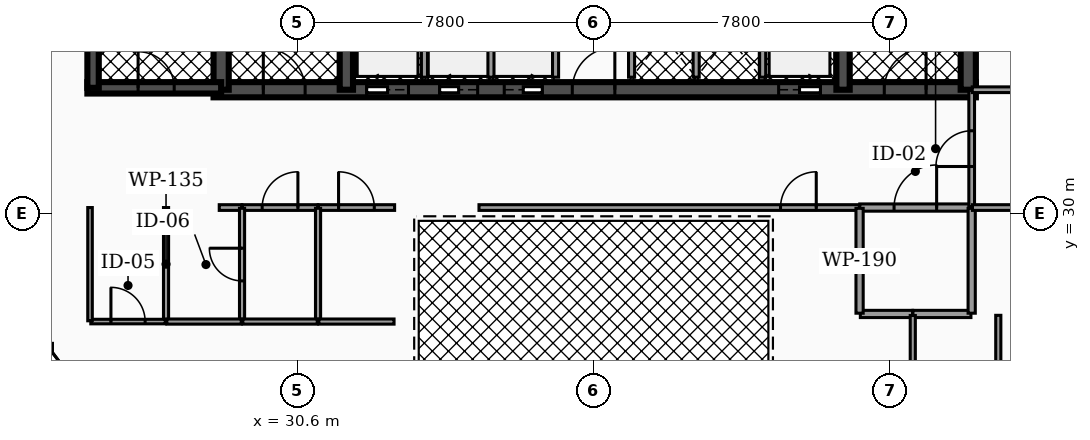
"""IFC4 building model, lengths in metres.
Left out: names, types, materials, properties, quantities, classifications, styles, units other than length and angle.
Written with IfcOpenShell. Run it as: python <this file> out.ifc"""

import sys

from ifc_helpers import new_model, si_unit, direction, frame, frame_2d, origin, place, context, subcontext, project, spatial, rectangle, extrude, element, fill, save


model = new_model("IFC4")
c1 = context("Model", 3, precision=1e-05, world=origin(), true_north=direction((0.0, 1.0)))
c2 = subcontext(c1, "Body", "Model", "MODEL_VIEW")
j1 = project(units=[si_unit("LENGTHUNIT", "METRE"), si_unit("PLANEANGLEUNIT", "RADIAN")], contexts=[c1])
p1 = place(None, origin())
s1 = spatial("IfcSite", under=j1, at=p1, CompositionType="ELEMENT")
p2 = place(p1, origin())
s2 = spatial("IfcBuilding", under=s1, at=p2, CompositionType="ELEMENT")
p3 = place(p2, frame((0.0, 0.0, 172.04)))
s3 = spatial("IfcBuildingStorey", under=s2, at=p3, CompositionType="ELEMENT", Elevation=172.04)
p4 = place(p3, frame((28.4, 33.25, 0.0), z_axis=(0.0, 0.0, 1.0), x_axis=(1.0, 0.0, 0.0)))
e1 = element("IfcWall", 1, at=p4, inside=s3, PredefinedType="SHEAR", context=c2, shape_type="SweptSolid", body=[
    extrude(rectangle(XDim=20.06, YDim=0.4, at=frame_2d((10.03, 0.0))), origin(), (0.0, 0.0, 1.0), 3.5),
])
p5 = place(p4, frame((4.03, 0.0, 0.0)))
e2 = element("IfcOpeningElement", 2, at=p5, cuts=e1, PredefinedType="OPENING", context=c2, shape_type="SweptSolid", body=[
    extrude(rectangle(XDim=1.1, YDim=2.15, at=frame_2d((0.55, 1.075))), frame((0.0, 0.21, 0.0), z_axis=(0.0, -1.0, 0.0), x_axis=(1.0, 0.0, 0.0)), (0.0, 0.0, 1.0), 0.42),
])
p6 = place(p4, frame((14.87, 0.0, 0.0)))
e3 = element("IfcOpeningElement", 3, at=p6, cuts=e1, PredefinedType="OPENING", context=c2, shape_type="SweptSolid", body=[
    extrude(rectangle(XDim=1.1, YDim=2.15, at=frame_2d((0.55, 1.075))), frame((0.0, 0.21, 0.0), z_axis=(0.0, -1.0, 0.0), x_axis=(1.0, 0.0, 0.0)), (0.0, 0.0, 1.0), 0.42),
])
p7 = place(p4, frame((5.95, 0.0, 0.0)))
e4 = element("IfcOpeningElement", 4, at=p7, cuts=e1, PredefinedType="OPENING", context=c2, shape_type="SweptSolid", body=[
    extrude(rectangle(XDim=1.0, YDim=2.1, at=frame_2d((0.5, 1.05))), frame((0.0, 0.21, 0.0), z_axis=(0.0, -1.0, 0.0), x_axis=(1.0, 0.0, 0.0)), (0.0, 0.0, 1.0), 0.42),
])
p8 = place(p4, frame((7.65, 0.0, 0.0)))
e5 = element("IfcOpeningElement", 5, at=p8, cuts=e1, PredefinedType="OPENING", context=c2, shape_type="SweptSolid", body=[
    extrude(rectangle(XDim=1.0, YDim=2.1, at=frame_2d((0.5, 1.05))), frame((0.0, 0.21, 0.0), z_axis=(0.0, -1.0, 0.0), x_axis=(1.0, 0.0, 0.0)), (0.0, 0.0, 1.0), 0.42),
])
p9 = place(p4, frame((1.31, 0.0, 0.0)))
e6 = element("IfcOpeningElement", 6, at=p9, cuts=e1, PredefinedType="OPENING", context=c2, shape_type="SweptSolid", body=[
    extrude(rectangle(XDim=1.1, YDim=2.2, at=frame_2d((0.55, 1.1))), frame((0.0, 0.21, 0.0), z_axis=(0.0, -1.0, 0.0), x_axis=(1.0, 0.0, 0.0)), (0.0, 0.0, 1.0), 0.42),
])
p10 = place(p4, frame((9.44, 0.0, 0.0)))
e7 = element("IfcOpeningElement", 7, at=p10, cuts=e1, PredefinedType="OPENING", context=c2, shape_type="SweptSolid", body=[
    extrude(rectangle(XDim=1.12, YDim=2.05, at=frame_2d((0.56, 1.025))), frame((0.0, 0.21, 0.0), z_axis=(0.0, -1.0, 0.0), x_axis=(1.0, 0.0, 0.0)), (0.0, 0.0, 1.0), 0.42),
])
p11 = place(p4, frame((17.65, 0.0, 0.0)))
e8 = element("IfcOpeningElement", 8, at=p11, cuts=e1, PredefinedType="OPENING", context=c2, shape_type="SweptSolid", body=[
    extrude(rectangle(XDim=1.1, YDim=2.2, at=frame_2d((0.55, 1.1))), frame((0.0, 0.21, 0.0), z_axis=(0.0, -1.0, 0.0), x_axis=(1.0, 0.0, 0.0)), (0.0, 0.0, 1.0), 0.42),
])
p12 = place(p3, frame((28.6, 33.25, 0.0), z_axis=(0.0, 0.0, 1.0), x_axis=(0.0, 1.0, 0.0)))
e9 = element("IfcWall", 9, at=p12, inside=s3, PredefinedType="SHEAR", context=c2, shape_type="SweptSolid", body=[
    extrude(rectangle(XDim=10.2, YDim=0.4, at=frame_2d((5.1, 0.0))), origin(), (0.0, 0.0, 1.0), 3.5),
])
for number, where, z_axis, x_axis in (
    (10, (31.895, 33.25, 0.0), (0.0, 0.0, 1.0), (0.0, 1.0, 0.0)),
    (11, (44.965, 33.25, 0.0), (0.0, 0.0, 1.0), (0.0, 1.0, 0.0)),
):
    element("IfcWall", number, at=place(p3, frame(where, z_axis=z_axis, x_axis=x_axis)), inside=s3, PredefinedType="SHEAR", context=c2, shape_type="SweptSolid", body=[
        extrude(rectangle(XDim=10.2, YDim=0.35, at=frame_2d((5.1, 0.0))), origin(), (0.0, 0.0, 1.0), 3.5),
    ])
p13 = place(p3, frame((48.26, 33.25, 0.0), z_axis=(0.0, 0.0, 1.0), x_axis=(0.0, 1.0, 0.0)))
e12 = element("IfcWall", 12, at=p13, inside=s3, PredefinedType="SHEAR", context=c2, shape_type="SweptSolid", body=[
    extrude(rectangle(XDim=10.2, YDim=0.4, at=frame_2d((5.1, 0.0))), origin(), (0.0, 0.0, 1.0), 3.5),
])
p14 = place(p3, frame((25.08, 33.3, 0.0), z_axis=(0.0, 0.0, 1.0), x_axis=(1.0, 0.0, 0.0)))
e13 = element("IfcWall", 13, at=p14, inside=s3, PredefinedType="SHEAR", context=c2, shape_type="SweptSolid", body=[
    extrude(rectangle(XDim=3.52, YDim=0.3, at=frame_2d((1.76, 0.0))), origin(), (0.0, 0.0, 1.0), 3.5),
])
p15 = place(p14, frame((1.335, 0.0, 0.0)))
e14 = element("IfcOpeningElement", 14, at=p15, cuts=e13, PredefinedType="OPENING", context=c2, shape_type="SweptSolid", body=[
    extrude(rectangle(XDim=0.95, YDim=2.2, at=frame_2d((0.475, 1.1))), frame((0.0, 0.16, 0.0), z_axis=(0.0, -1.0, 0.0), x_axis=(1.0, 0.0, 0.0)), (0.0, 0.0, 1.0), 0.32),
])
p16 = place(p3, frame((25.23, 33.3, 0.0), z_axis=(0.0, 0.0, 1.0), x_axis=(0.0, 1.0, 0.0)))
e15 = element("IfcWall", 15, at=p16, inside=s3, PredefinedType="SHEAR", context=c2, shape_type="SweptSolid", body=[
    extrude(rectangle(XDim=7.6, YDim=0.3, at=frame_2d((3.8, 0.0))), origin(), (0.0, 0.0, 1.0), 3.5),
])
for number, where, z_axis, x_axis in (
    (16, (33.95, 33.58, 0.0), (0.0, 0.0, 1.0), (0.0, 1.0, 0.0)),
    (17, (42.85, 33.58, 0.0), (0.0, 0.0, 1.0), (0.0, 1.0, 0.0)),
):
    element("IfcWall", number, at=place(p3, frame(where, z_axis=z_axis, x_axis=x_axis)), inside=s3, PredefinedType="SOLIDWALL", context=c2, shape_type="SweptSolid", body=[
        extrude(rectangle(XDim=2.45, YDim=0.16, at=frame_2d((1.225, 0.0))), origin(), (0.0, 0.0, 1.0), 2.472),
    ])
for number, where, z_axis, x_axis in (
    (18, (35.7, 33.58, 0.0), (0.0, 0.0, 1.0), (0.0, 1.0, 0.0)),
    (19, (37.4, 33.58, 0.0), (0.0, 0.0, 1.0), (0.0, 1.0, 0.0)),
    (20, (39.4, 33.58, 0.0), (0.0, 0.0, 1.0), (0.0, 1.0, 0.0)),
    (21, (41.1, 33.58, 0.0), (0.0, 0.0, 1.0), (0.0, 1.0, 0.0)),
):
    element("IfcWall", number, at=place(p3, frame(where, z_axis=z_axis, x_axis=x_axis)), inside=s3, PredefinedType="SOLIDWALL", context=c2, shape_type="SweptSolid", body=[
        extrude(rectangle(XDim=2.25, YDim=0.16, at=frame_2d((1.125, 0.0))), origin(), (0.0, 0.0, 1.0), 2.472),
    ])
p17 = place(p3, frame((45.405, 30.15, 0.0), z_axis=(0.0, 0.0, 1.0), x_axis=(1.0, 0.0, 0.0)))
e22 = element("IfcWall", 22, at=p17, inside=s3, PredefinedType="PARTITIONING", context=c2, shape_type="SweptSolid", body=[
    extrude(rectangle(XDim=2.925, YDim=0.19, at=frame_2d((1.462, 0.0))), origin(), (0.0, 0.0, 1.0), 2.457),
])
p18 = place(p17, frame((0.903, 0.0, 0.0)))
e23 = element("IfcOpeningElement", 23, at=p18, cuts=e22, PredefinedType="OPENING", context=c2, shape_type="SweptSolid", body=[
    extrude(rectangle(XDim=1.12, YDim=2.05, at=frame_2d((0.56, 1.025))), frame((0.0, 0.105, 0.0), z_axis=(0.0, -1.0, 0.0), x_axis=(1.0, 0.0, 0.0)), (0.0, 0.0, 1.0), 0.21),
])
p19 = place(p3, frame((48.35, 30.17, 0.0), z_axis=(0.0, 0.0, 1.0), x_axis=(0.0, 1.0, 0.0)))
e24 = element("IfcWall", 24, at=p19, inside=s3, PredefinedType="PARTITIONING", context=c2, shape_type="SweptSolid", body=[
    extrude(rectangle(XDim=3.06, YDim=0.15, at=frame_2d((1.53, 0.0))), origin(), (0.0, 0.0, 1.0), 2.457),
])
p20 = place(p19, frame((1.06, 0.0, 0.0)))
e25 = element("IfcOpeningElement", 25, at=p20, cuts=e24, PredefinedType="OPENING", context=c2, shape_type="SweptSolid", body=[
    extrude(rectangle(XDim=0.94, YDim=2.05, at=frame_2d((0.47, 1.025))), frame((0.0, 0.085, 0.0), z_axis=(0.0, -1.0, 0.0), x_axis=(1.0, 0.0, 0.0)), (0.0, 0.0, 1.0), 0.17),
])
p21 = place(p3, frame((28.55, 30.15, 0.0), z_axis=(0.0, 0.0, 1.0), x_axis=(1.0, 0.0, 0.0)))
e26 = element("IfcWall", 26, at=p21, inside=s3, PredefinedType="PARTITIONING", context=c2, shape_type="SweptSolid", body=[
    extrude(rectangle(XDim=0.595, YDim=0.15, at=frame_2d((0.297, 0.0))), origin(), (0.0, 0.0, 1.0), 2.457),
])
p22 = place(p3, frame((29.155, 30.15, 0.0), z_axis=(0.0, 0.0, 1.0), x_axis=(1.0, 0.0, 0.0)))
e27 = element("IfcWall", 27, at=p22, inside=s3, PredefinedType="PARTITIONING", context=c2, shape_type="SweptSolid", body=[
    extrude(rectangle(XDim=1.99, YDim=0.15, at=frame_2d((0.995, 0.0))), origin(), (0.0, 0.0, 1.0), 2.457),
])
p23 = place(p22, frame((0.525, 0.0, 0.0)))
e28 = element("IfcOpeningElement", 28, at=p23, cuts=e27, PredefinedType="OPENING", context=c2, shape_type="SweptSolid", body=[
    extrude(rectangle(XDim=0.94, YDim=2.05, at=frame_2d((0.47, 1.025))), frame((0.0, 0.085, 0.0), z_axis=(0.0, -1.0, 0.0), x_axis=(1.0, 0.0, 0.0)), (0.0, 0.0, 1.0), 0.17),
])
p24 = place(p3, frame((31.155, 30.15, 0.0), z_axis=(0.0, 0.0, 1.0), x_axis=(1.0, 0.0, 0.0)))
e29 = element("IfcWall", 29, at=p24, inside=s3, PredefinedType="PARTITIONING", context=c2, shape_type="SweptSolid", body=[
    extrude(rectangle(XDim=2.01, YDim=0.15, at=frame_2d((1.005, 0.0))), origin(), (0.0, 0.0, 1.0), 2.457),
])
p25 = place(p24, frame((0.535, 0.0, 0.0)))
e30 = element("IfcOpeningElement", 30, at=p25, cuts=e29, PredefinedType="OPENING", context=c2, shape_type="SweptSolid", body=[
    extrude(rectangle(XDim=0.94, YDim=2.05, at=frame_2d((0.47, 1.025))), frame((0.0, 0.085, 0.0), z_axis=(0.0, -1.0, 0.0), x_axis=(1.0, 0.0, 0.0)), (0.0, 0.0, 1.0), 0.17),
])
p26 = place(p3, frame((35.385, 30.15, 0.0), z_axis=(0.0, 0.0, 1.0), x_axis=(1.0, 0.0, 0.0)))
e31 = element("IfcWall", 31, at=p26, inside=s3, PredefinedType="PARTITIONING", context=c2, shape_type="SweptSolid", body=[
    extrude(rectangle(XDim=10.01, YDim=0.15, at=frame_2d((5.005, 0.0))), origin(), (0.0, 0.0, 1.0), 2.457),
])
p27 = place(p26, frame((7.935, 0.0, 0.0)))
e32 = element("IfcOpeningElement", 32, at=p27, cuts=e31, PredefinedType="OPENING", context=c2, shape_type="SweptSolid", body=[
    extrude(rectangle(XDim=0.94, YDim=2.05, at=frame_2d((0.47, 1.025))), frame((0.0, 0.085, 0.0), z_axis=(0.0, -1.0, 0.0), x_axis=(1.0, 0.0, 0.0)), (0.0, 0.0, 1.0), 0.17),
])
p28 = place(p3, frame((45.42, 27.35, 0.0), z_axis=(0.0, 0.0, 1.0), x_axis=(1.0, 0.0, 0.0)))
e33 = element("IfcWall", 33, at=p28, inside=s3, PredefinedType="PARTITIONING", context=c2, shape_type="SweptSolid", body=[
    extrude(rectangle(XDim=1.375, YDim=0.19, at=frame_2d((0.688, 0.0))), origin(), (0.0, 0.0, 1.0), 2.457),
])
p29 = place(p3, frame((45.4, 27.37, 0.0), z_axis=(0.0, 0.0, 1.0), x_axis=(0.0, 1.0, 0.0)))
e34 = element("IfcWall", 34, at=p29, inside=s3, PredefinedType="PARTITIONING", context=c2, shape_type="SweptSolid", body=[
    extrude(rectangle(XDim=2.76, YDim=0.19, at=frame_2d((1.38, 0.0))), origin(), (0.0, 0.0, 1.0), 2.457),
])
p30 = place(p3, frame((46.805, 27.35, 0.0), z_axis=(0.0, 0.0, 1.0), x_axis=(1.0, 0.0, 0.0)))
e35 = element("IfcWall", 35, at=p30, inside=s3, PredefinedType="PARTITIONING", context=c2, shape_type="SweptSolid", body=[
    extrude(rectangle(XDim=1.525, YDim=0.19, at=frame_2d((0.763, 0.0))), origin(), (0.0, 0.0, 1.0), 2.457),
])
p31 = place(p3, frame((48.35, 27.37, 0.0), z_axis=(0.0, 0.0, 1.0), x_axis=(0.0, 1.0, 0.0)))
e36 = element("IfcWall", 36, at=p31, inside=s3, PredefinedType="PARTITIONING", context=c2, shape_type="SweptSolid", body=[
    extrude(rectangle(XDim=2.76, YDim=0.19, at=frame_2d((1.38, 0.0))), origin(), (0.0, 0.0, 1.0), 2.457),
])
p32 = place(p3, frame((48.37, 30.15, 0.0), z_axis=(0.0, 0.0, 1.0), x_axis=(1.0, 0.0, 0.0)))
e37 = element("IfcWall", 37, at=p32, inside=s3, PredefinedType="PARTITIONING", context=c2, shape_type="SweptSolid", body=[
    extrude(rectangle(XDim=3.26, YDim=0.15, at=frame_2d((1.63, 0.0))), origin(), (0.0, 0.0, 1.0), 2.457),
])
p33 = place(p32, frame((1.16, 0.0, 0.0)))
e38 = element("IfcOpeningElement", 38, at=p33, cuts=e37, PredefinedType="OPENING", context=c2, shape_type="SweptSolid", body=[
    extrude(rectangle(XDim=0.94, YDim=2.05, at=frame_2d((0.47, 1.025))), frame((0.0, 0.085, 0.0), z_axis=(0.0, -1.0, 0.0), x_axis=(1.0, 0.0, 0.0)), (0.0, 0.0, 1.0), 0.17),
])
p34 = place(p3, frame((48.365, 33.25, 0.0), z_axis=(0.0, 0.0, 1.0), x_axis=(1.0, 0.0, 0.0)))
e39 = element("IfcWall", 39, at=p34, inside=s3, PredefinedType="PARTITIONING", context=c2, shape_type="SweptSolid", body=[
    extrude(rectangle(XDim=3.265, YDim=0.15, at=frame_2d((1.632, 0.0))), origin(), (0.0, 0.0, 1.0), 2.457),
])
p35 = place(p3, frame((27.15, 27.17, 0.0), z_axis=(0.0, 0.0, 1.0), x_axis=(0.0, 1.0, 0.0)))
e40 = element("IfcWall", 40, at=p35, inside=s3, PredefinedType="PARTITIONING", context=c2, shape_type="SweptSolid", body=[
    extrude(rectangle(XDim=2.98, YDim=0.135, at=frame_2d((1.49, 0.0))), origin(), (0.0, 0.0, 1.0), 2.457),
])
p36 = place(p3, frame((25.17, 27.15, 0.0), z_axis=(0.0, 0.0, 1.0), x_axis=(1.0, 0.0, 0.0)))
e41 = element("IfcWall", 41, at=p36, inside=s3, PredefinedType="PARTITIONING", context=c2, shape_type="SweptSolid", body=[
    extrude(rectangle(XDim=1.96, YDim=0.12, at=frame_2d((0.98, 0.0))), origin(), (0.0, 0.0, 1.0), 2.457),
])
p37 = place(p36, frame((0.53, 0.0, 0.0)))
e42 = element("IfcOpeningElement", 42, at=p37, cuts=e41, PredefinedType="OPENING", context=c2, shape_type="SweptSolid", body=[
    extrude(rectangle(XDim=0.9, YDim=2.05, at=frame_2d((0.45, 1.025))), frame((0.0, 0.07, 0.0), z_axis=(0.0, -1.0, 0.0), x_axis=(1.0, 0.0, 0.0)), (0.0, 0.0, 1.0), 0.14),
])
p38 = place(p3, frame((25.15, 27.17, 0.0), z_axis=(0.0, 0.0, 1.0), x_axis=(0.0, 1.0, 0.0)))
e43 = element("IfcWall", 43, at=p38, inside=s3, PredefinedType="PARTITIONING", context=c2, shape_type="SweptSolid", body=[
    extrude(rectangle(XDim=2.98, YDim=0.12, at=frame_2d((1.49, 0.0))), origin(), (0.0, 0.0, 1.0), 2.457),
])
p39 = place(p3, frame((29.15, 27.17, 0.0), z_axis=(0.0, 0.0, 1.0), x_axis=(0.0, 1.0, 0.0)))
e44 = element("IfcWall", 44, at=p39, inside=s3, PredefinedType="PARTITIONING", context=c2, shape_type="SweptSolid", body=[
    extrude(rectangle(XDim=2.96, YDim=0.135, at=frame_2d((1.48, 0.0))), origin(), (0.0, 0.0, 1.0), 2.457),
])
p40 = place(p39, frame((1.05, 0.0, 0.0)))
e45 = element("IfcOpeningElement", 45, at=p40, cuts=e44, PredefinedType="OPENING", context=c2, shape_type="SweptSolid", body=[
    extrude(rectangle(XDim=0.86, YDim=2.05, at=frame_2d((0.43, 1.025))), frame((0.0, 0.077, 0.0), z_axis=(0.0, -1.0, 0.0), x_axis=(1.0, 0.0, 0.0)), (0.0, 0.0, 1.0), 0.155),
])
p41 = place(p3, frame((27.17, 27.15, 0.0), z_axis=(0.0, 0.0, 1.0), x_axis=(1.0, 0.0, 0.0)))
e46 = element("IfcWall", 46, at=p41, inside=s3, PredefinedType="PARTITIONING", context=c2, shape_type="SweptSolid", body=[
    extrude(rectangle(XDim=1.96, YDim=0.135, at=frame_2d((0.98, 0.0))), origin(), (0.0, 0.0, 1.0), 2.457),
])
p42 = place(p3, frame((31.15, 27.17, 0.0), z_axis=(0.0, 0.0, 1.0), x_axis=(0.0, 1.0, 0.0)))
e47 = element("IfcWall", 47, at=p42, inside=s3, PredefinedType="PARTITIONING", context=c2, shape_type="SweptSolid", body=[
    extrude(rectangle(XDim=2.96, YDim=0.135, at=frame_2d((1.48, 0.0))), origin(), (0.0, 0.0, 1.0), 2.457),
])
p43 = place(p3, frame((29.17, 27.15, 0.0), z_axis=(0.0, 0.0, 1.0), x_axis=(1.0, 0.0, 0.0)))
e48 = element("IfcWall", 48, at=p43, inside=s3, PredefinedType="PARTITIONING", context=c2, shape_type="SweptSolid", body=[
    extrude(rectangle(XDim=1.96, YDim=0.135, at=frame_2d((0.98, 0.0))), origin(), (0.0, 0.0, 1.0), 2.457),
])
p44 = place(p3, frame((31.17, 27.15, 0.0), z_axis=(0.0, 0.0, 1.0), x_axis=(1.0, 0.0, 0.0)))
e49 = element("IfcWall", 49, at=p44, inside=s3, PredefinedType="PARTITIONING", context=c2, shape_type="SweptSolid", body=[
    extrude(rectangle(XDim=1.98, YDim=0.135, at=frame_2d((0.99, 0.0))), origin(), (0.0, 0.0, 1.0), 2.457),
])
p45 = place(p3, frame((46.8, 25.169, 0.0), z_axis=(0.0, 0.0, 1.0), x_axis=(0.0, 1.0, 0.0)))
e50 = element("IfcWall", 50, at=p45, inside=s3, PredefinedType="PARTITIONING", context=c2, shape_type="SweptSolid", body=[
    extrude(rectangle(XDim=2.14, YDim=0.135, at=frame_2d((1.07, 0.0))), origin(), (0.0, 0.0, 1.0), 2.457),
])
p46 = place(p3, frame((49.05, 25.184, 0.0), z_axis=(0.0, 0.0, 1.0), x_axis=(0.0, 1.0, 0.0)))
e51 = element("IfcWall", 51, at=p46, inside=s3, PredefinedType="PARTITIONING", context=c2, shape_type="SweptSolid", body=[
    extrude(rectangle(XDim=2.13, YDim=0.135, at=frame_2d((1.065, 0.0))), origin(), (0.0, 0.0, 1.0), 2.457),
])
p47 = place(p5, origin())
e52 = element("IfcDoor", 52, at=p47, inside=s3, OperationType="SLIDING_TO_LEFT", PredefinedType="DOOR", context=c2, shape_type="SweptSolid", body=[
    extrude(rectangle(XDim=1.1, YDim=2.15, at=frame_2d((0.55, 1.075))), frame((0.0, 0.025, 0.0), z_axis=(0.0, -1.0, 0.0), x_axis=(1.0, 0.0, 0.0)), (0.0, 0.0, 1.0), 0.05),
])
fill(e2, e52)
p48 = place(p6, origin())
e53 = element("IfcDoor", 53, at=p48, inside=s3, OperationType="SLIDING_TO_RIGHT", PredefinedType="DOOR", context=c2, shape_type="SweptSolid", body=[
    extrude(rectangle(XDim=1.1, YDim=2.15, at=frame_2d((0.55, 1.075))), frame((0.0, 0.025, 0.0), z_axis=(0.0, -1.0, 0.0), x_axis=(1.0, 0.0, 0.0)), (0.0, 0.0, 1.0), 0.05),
])
fill(e3, e53)
p49 = place(p7, origin())
e54 = element("IfcDoor", 54, at=p49, inside=s3, OperationType="SLIDING_TO_LEFT", PredefinedType="DOOR", context=c2, shape_type="SweptSolid", body=[
    extrude(rectangle(XDim=1.0, YDim=2.1, at=frame_2d((0.5, 1.05))), frame((0.0, 0.025, 0.0), z_axis=(0.0, -1.0, 0.0), x_axis=(1.0, 0.0, 0.0)), (0.0, 0.0, 1.0), 0.05),
])
fill(e4, e54)
p50 = place(p8, origin())
e55 = element("IfcDoor", 55, at=p50, inside=s3, OperationType="SLIDING_TO_RIGHT", PredefinedType="DOOR", context=c2, shape_type="SweptSolid", body=[
    extrude(rectangle(XDim=1.0, YDim=2.1, at=frame_2d((0.5, 1.05))), frame((0.0, 0.025, 0.0), z_axis=(0.0, -1.0, 0.0), x_axis=(1.0, 0.0, 0.0)), (0.0, 0.0, 1.0), 0.05),
])
fill(e5, e55)
p51 = place(p9, origin())
e56 = element("IfcDoor", 56, at=p51, inside=s3, OperationType="SINGLE_SWING_LEFT", PredefinedType="DOOR", context=c2, shape_type="SweptSolid", body=[
    extrude(rectangle(XDim=1.1, YDim=2.2, at=frame_2d((0.55, 1.1))), frame((0.0, 0.025, 0.0), z_axis=(0.0, -1.0, 0.0), x_axis=(1.0, 0.0, 0.0)), (0.0, 0.0, 1.0), 0.05),
])
fill(e6, e56)
p52 = place(p10, origin())
e57 = element("IfcDoor", 57, at=p52, inside=s3, OperationType="SINGLE_SWING_RIGHT", PredefinedType="DOOR", context=c2, shape_type="SweptSolid", body=[
    extrude(rectangle(XDim=1.12, YDim=2.05, at=frame_2d((0.56, 1.025))), frame((0.0, 0.025, 0.0), z_axis=(0.0, -1.0, 0.0), x_axis=(1.0, 0.0, 0.0)), (0.0, 0.0, 1.0), 0.05),
])
fill(e7, e57)
p53 = place(p11, origin())
e58 = element("IfcDoor", 58, at=p53, inside=s3, OperationType="SINGLE_SWING_RIGHT", PredefinedType="DOOR", context=c2, shape_type="SweptSolid", body=[
    extrude(rectangle(XDim=1.1, YDim=2.2, at=frame_2d((0.55, 1.1))), frame((0.0, 0.025, 0.0), z_axis=(0.0, -1.0, 0.0), x_axis=(1.0, 0.0, 0.0)), (0.0, 0.0, 1.0), 0.05),
])
fill(e8, e58)
p54 = place(p15, origin())
e59 = element("IfcDoor", 59, at=p54, inside=s3, OperationType="SINGLE_SWING_LEFT", PredefinedType="DOOR", context=c2, shape_type="SweptSolid", body=[
    extrude(rectangle(XDim=0.95, YDim=2.2, at=frame_2d((0.475, 1.1))), frame((0.0, 0.025, 0.0), z_axis=(0.0, -1.0, 0.0), x_axis=(1.0, 0.0, 0.0)), (0.0, 0.0, 1.0), 0.05),
])
fill(e14, e59)
p55 = place(p18, origin())
e60 = element("IfcDoor", 60, at=p55, inside=s3, OperationType="SINGLE_SWING_RIGHT", PredefinedType="DOOR", context=c2, shape_type="SweptSolid", body=[
    extrude(rectangle(XDim=1.12, YDim=2.05, at=frame_2d((0.56, 1.025))), frame((0.0, 0.025, 0.0), z_axis=(0.0, -1.0, 0.0), x_axis=(1.0, 0.0, 0.0)), (0.0, 0.0, 1.0), 0.05),
])
fill(e23, e60)
p56 = place(p20, origin())
e61 = element("IfcDoor", 61, at=p56, inside=s3, OperationType="SINGLE_SWING_LEFT", PredefinedType="DOOR", context=c2, shape_type="SweptSolid", body=[
    extrude(rectangle(XDim=0.94, YDim=2.05, at=frame_2d((0.47, 1.025))), frame((0.0, 0.025, 0.0), z_axis=(0.0, -1.0, 0.0), x_axis=(1.0, 0.0, 0.0)), (0.0, 0.0, 1.0), 0.05),
])
fill(e25, e61)
p57 = place(p23, origin())
e62 = element("IfcDoor", 62, at=p57, inside=s3, OperationType="SINGLE_SWING_RIGHT", PredefinedType="DOOR", context=c2, shape_type="SweptSolid", body=[
    extrude(rectangle(XDim=0.94, YDim=2.05, at=frame_2d((0.47, 1.025))), frame((0.0, 0.025, 0.0), z_axis=(0.0, -1.0, 0.0), x_axis=(1.0, 0.0, 0.0)), (0.0, 0.0, 1.0), 0.05),
])
fill(e28, e62)
p58 = place(p25, origin())
e63 = element("IfcDoor", 63, at=p58, inside=s3, OperationType="SINGLE_SWING_LEFT", PredefinedType="DOOR", context=c2, shape_type="SweptSolid", body=[
    extrude(rectangle(XDim=0.94, YDim=2.05, at=frame_2d((0.47, 1.025))), frame((0.0, 0.025, 0.0), z_axis=(0.0, -1.0, 0.0), x_axis=(1.0, 0.0, 0.0)), (0.0, 0.0, 1.0), 0.05),
])
fill(e30, e63)
p59 = place(p27, origin())
e64 = element("IfcDoor", 64, at=p59, inside=s3, OperationType="SINGLE_SWING_RIGHT", PredefinedType="DOOR", context=c2, shape_type="SweptSolid", body=[
    extrude(rectangle(XDim=0.94, YDim=2.05, at=frame_2d((0.47, 1.025))), frame((0.0, 0.025, 0.0), z_axis=(0.0, -1.0, 0.0), x_axis=(1.0, 0.0, 0.0)), (0.0, 0.0, 1.0), 0.05),
])
fill(e32, e64)
p60 = place(p37, origin())
e65 = element("IfcDoor", 65, at=p60, inside=s3, OperationType="SINGLE_SWING_LEFT", PredefinedType="DOOR", context=c2, shape_type="SweptSolid", body=[
    extrude(rectangle(XDim=0.9, YDim=2.05, at=frame_2d((0.45, 1.025))), frame((0.0, 0.025, 0.0), z_axis=(0.0, -1.0, 0.0), x_axis=(1.0, 0.0, 0.0)), (0.0, 0.0, 1.0), 0.05),
])
fill(e42, e65)
p61 = place(p40, origin())
e66 = element("IfcDoor", 66, at=p61, inside=s3, OperationType="SINGLE_SWING_RIGHT", PredefinedType="DOOR", context=c2, shape_type="SweptSolid", body=[
    extrude(rectangle(XDim=0.86, YDim=2.05, at=frame_2d((0.43, 1.025))), frame((0.0, 0.025, 0.0), z_axis=(0.0, -1.0, 0.0), x_axis=(1.0, 0.0, 0.0)), (0.0, 0.0, 1.0), 0.05),
])
fill(e45, e66)
save(model, sys.argv[1])
